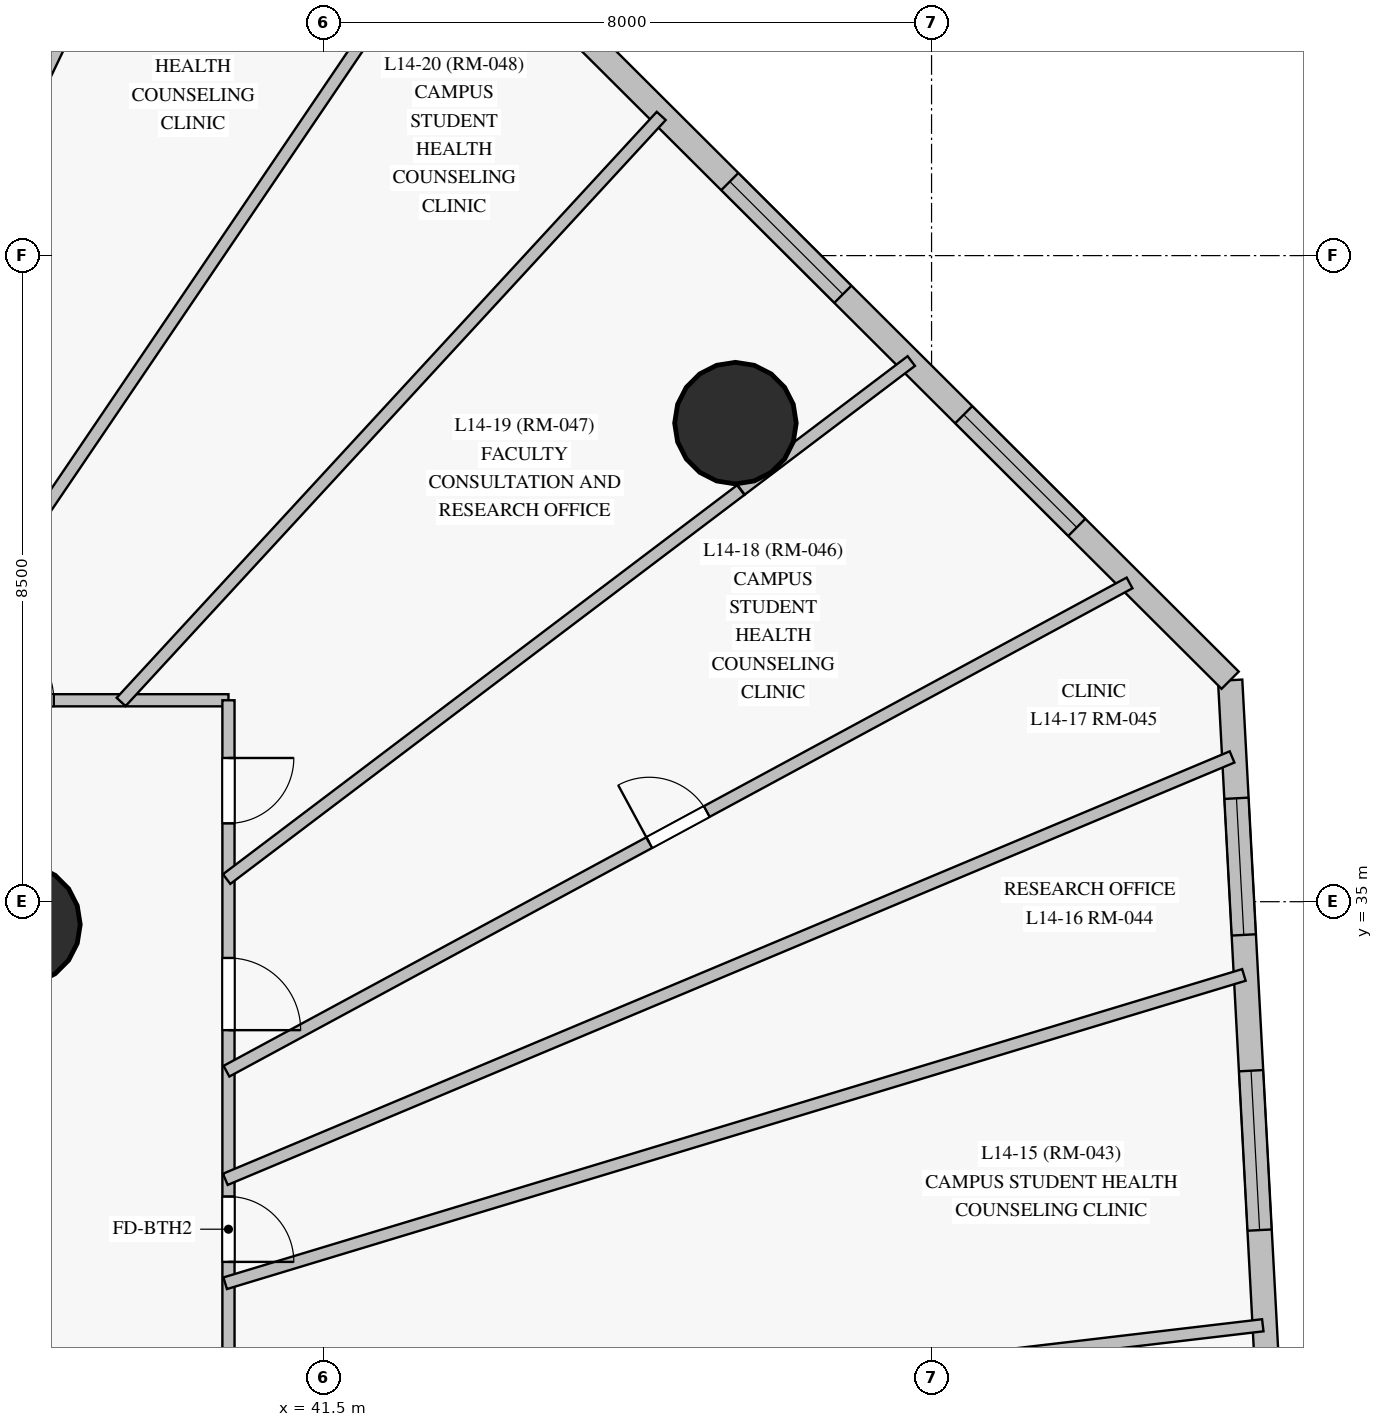
"""IFC4 building model, lengths in metres.
Left out: names, types, materials, properties, quantities, classifications, styles, units other than length and angle.
Written with IfcOpenShell. Run it as: python <this file> out.ifc"""

import sys

from ifc_helpers import new_model, si_unit, direction, frame, frame_2d, origin, origin_with_axes, origin_2d, place, context, subcontext, project, spatial, rectangle, circle, extrude, source, transform, mapped, element, fill, save


model = new_model("IFC4")
c1 = context("Model", 3, precision=1e-05, world=origin(), true_north=direction((0.0, 1.0)))
c2 = subcontext(c1, "Body", "Model", "MODEL_VIEW")
j1 = project(units=[si_unit("LENGTHUNIT", "METRE"), si_unit("PLANEANGLEUNIT", "RADIAN")], contexts=[c1])
p1 = place(None, origin())
s1 = spatial("IfcSite", under=j1, at=p1, CompositionType="ELEMENT")
p2 = place(p1, origin())
s2 = spatial("IfcBuilding", under=s1, at=p2, CompositionType="ELEMENT")
p3 = place(p2, frame((0.0, 0.0, 55.3)))
s3 = spatial("IfcBuildingStorey", under=s2, at=p3, CompositionType="ELEMENT", Elevation=55.3)
m1 = source(origin_with_axes(), c2, "Body", "SweptSolid", [
    extrude(circle(Radius=0.8, at=origin_2d()), origin(), (0.0, 0.0, 1.0), 3.6),
])
for number, where, z_axis, x_axis in (
    (1, (37.5, 34.7, 0.0), (0.0, 0.0, 1.0), (1.0, 0.0, 0.0)),
    (2, (46.92, 41.296, 0.0), (0.0, 0.0, 1.0), (1.0, 0.0, 0.0)),
):
    element("IfcColumn", number, at=place(p3, frame(where, z_axis=z_axis, x_axis=x_axis)), inside=s3, PredefinedType="COLUMN", context=c2, shape_type="MappedRepresentation", body=[
        mapped(m1, transform((0.0, 0.0, 0.0), scale=1.0)),
    ])
p4 = place(p3, frame((53.981, 27.6, 0.0), z_axis=(0.0, 0.0, 1.0), x_axis=(-0.053491775133, 0.9985682901, 0.0)))
e3 = element("IfcWall", 3, at=p4, inside=s3, PredefinedType="SOLIDWALL", context=c2, shape_type="SweptSolid", body=[
    extrude(rectangle(XDim=10.329, YDim=0.32, at=frame_2d((5.164, 0.0))), origin(), (0.0, 0.0, 1.0), 3.35),
])
p5 = place(p4, frame((3.084, 0.0, 0.85)))
e4 = element("IfcOpeningElement", 4, at=p5, cuts=e3, PredefinedType="OPENING", context=c2, shape_type="SweptSolid", body=[
    extrude(rectangle(XDim=2.1, YDim=1.95, at=frame_2d((1.05, 0.975))), frame((0.0, 0.17, 0.0), z_axis=(0.0, -1.0, 0.0), x_axis=(1.0, 0.0, 0.0)), (0.0, 0.0, 1.0), 0.34),
])
p6 = place(p4, frame((6.973, 0.0, 0.85)))
e5 = element("IfcOpeningElement", 5, at=p6, cuts=e3, PredefinedType="OPENING", context=c2, shape_type="SweptSolid", body=[
    extrude(rectangle(XDim=1.8, YDim=1.85, at=frame_2d((0.9, 0.925))), frame((0.0, 0.17, 0.0), z_axis=(0.0, -1.0, 0.0), x_axis=(1.0, 0.0, 0.0)), (0.0, 0.0, 1.0), 0.34),
])
p7 = place(p3, frame((53.428, 37.914, 0.0), z_axis=(0.0, 0.0, 1.0), x_axis=(-0.708311107064, 0.70590040063, 0.0)))
e6 = element("IfcWall", 6, at=p7, inside=s3, PredefinedType="SOLIDWALL", context=c2, shape_type="SweptSolid", body=[
    extrude(rectangle(XDim=12.862, YDim=0.32, at=frame_2d((6.431, 0.0))), origin(), (0.0, 0.0, 1.0), 3.35),
])
p8 = place(p7, frame((2.848, 0.0, 0.85)))
e7 = element("IfcOpeningElement", 7, at=p8, cuts=e6, PredefinedType="OPENING", context=c2, shape_type="SweptSolid", body=[
    extrude(rectangle(XDim=2.1, YDim=1.95, at=frame_2d((1.05, 0.975))), frame((0.0, 0.17, 0.0), z_axis=(0.0, -1.0, 0.0), x_axis=(1.0, 0.0, 0.0)), (0.0, 0.0, 1.0), 0.34),
])
p9 = place(p7, frame((7.193, 0.0, 0.85)))
e8 = element("IfcOpeningElement", 8, at=p9, cuts=e6, PredefinedType="OPENING", context=c2, shape_type="SweptSolid", body=[
    extrude(rectangle(XDim=2.1, YDim=1.95, at=frame_2d((1.05, 0.975))), frame((0.0, 0.17, 0.0), z_axis=(0.0, -1.0, 0.0), x_axis=(1.0, 0.0, 0.0)), (0.0, 0.0, 1.0), 0.34),
])
p10 = place(p3, frame((10.5, 37.65, 0.0), z_axis=(0.0, 0.0, 1.0), x_axis=(1.0, 0.0, 0.0)))
e9 = element("IfcWall", 9, at=p10, inside=s3, PredefinedType="PARTITIONING", context=c2, shape_type="SweptSolid", body=[
    extrude(rectangle(XDim=29.75, YDim=0.16, at=frame_2d((14.875, 0.0))), origin(), (0.0, 0.0, 1.0), 2.75),
])
p11 = place(p10, frame((26.502, 0.0, 0.0)))
e10 = element("IfcOpeningElement", 10, at=p11, cuts=e9, PredefinedType="OPENING", context=c2, shape_type="SweptSolid", body=[
    extrude(rectangle(XDim=0.95, YDim=2.15, at=frame_2d((0.475, 1.075))), frame((0.0, 0.09, 0.0), z_axis=(0.0, -1.0, 0.0), x_axis=(1.0, 0.0, 0.0)), (0.0, 0.0, 1.0), 0.18),
])
p12 = place(p10, frame((24.014, 0.0, 0.0)))
e11 = element("IfcOpeningElement", 11, at=p12, cuts=e9, PredefinedType="OPENING", context=c2, shape_type="SweptSolid", body=[
    extrude(rectangle(XDim=0.95, YDim=2.15, at=frame_2d((0.475, 1.075))), frame((0.0, 0.09, 0.0), z_axis=(0.0, -1.0, 0.0), x_axis=(1.0, 0.0, 0.0)), (0.0, 0.0, 1.0), 0.18),
])
p13 = place(p10, frame((21.837, 0.0, 0.0)))
e12 = element("IfcOpeningElement", 12, at=p13, cuts=e9, PredefinedType="OPENING", context=c2, shape_type="SweptSolid", body=[
    extrude(rectangle(XDim=0.95, YDim=2.15, at=frame_2d((0.475, 1.075))), frame((0.0, 0.09, 0.0), z_axis=(0.0, -1.0, 0.0), x_axis=(1.0, 0.0, 0.0)), (0.0, 0.0, 1.0), 0.18),
])
p14 = place(p10, frame((18.823, 0.0, 0.0)))
e13 = element("IfcOpeningElement", 13, at=p14, cuts=e9, PredefinedType="OPENING", context=c2, shape_type="SweptSolid", body=[
    extrude(rectangle(XDim=0.95, YDim=2.15, at=frame_2d((0.475, 1.075))), frame((0.0, 0.09, 0.0), z_axis=(0.0, -1.0, 0.0), x_axis=(1.0, 0.0, 0.0)), (0.0, 0.0, 1.0), 0.18),
])
p15 = place(p10, frame((15.836, 0.0, 0.0)))
e14 = element("IfcOpeningElement", 14, at=p15, cuts=e9, PredefinedType="OPENING", context=c2, shape_type="SweptSolid", body=[
    extrude(rectangle(XDim=0.95, YDim=2.15, at=frame_2d((0.475, 1.075))), frame((0.0, 0.09, 0.0), z_axis=(0.0, -1.0, 0.0), x_axis=(1.0, 0.0, 0.0)), (0.0, 0.0, 1.0), 0.18),
])
p16 = place(p10, frame((13.96, 0.0, 0.0)))
e15 = element("IfcOpeningElement", 15, at=p16, cuts=e9, PredefinedType="OPENING", context=c2, shape_type="SweptSolid", body=[
    extrude(rectangle(XDim=0.95, YDim=2.15, at=frame_2d((0.475, 1.075))), frame((0.0, 0.09, 0.0), z_axis=(0.0, -1.0, 0.0), x_axis=(1.0, 0.0, 0.0)), (0.0, 0.0, 1.0), 0.18),
])
p17 = place(p10, frame((9.938, 0.0, 0.0)))
e16 = element("IfcOpeningElement", 16, at=p17, cuts=e9, PredefinedType="OPENING", context=c2, shape_type="SweptSolid", body=[
    extrude(rectangle(XDim=0.95, YDim=2.15, at=frame_2d((0.475, 1.075))), frame((0.0, 0.09, 0.0), z_axis=(0.0, -1.0, 0.0), x_axis=(1.0, 0.0, 0.0)), (0.0, 0.0, 1.0), 0.18),
])
p18 = place(p10, frame((2.577, 0.0, 0.0)))
e17 = element("IfcOpeningElement", 17, at=p18, cuts=e9, PredefinedType="OPENING", context=c2, shape_type="SweptSolid", body=[
    extrude(rectangle(XDim=0.95, YDim=2.15, at=frame_2d((0.475, 1.075))), frame((0.0, 0.09, 0.0), z_axis=(0.0, -1.0, 0.0), x_axis=(1.0, 0.0, 0.0)), (0.0, 0.0, 1.0), 0.18),
])
p19 = place(p3, frame((40.25, 37.65, 0.0), z_axis=(0.0, 0.0, 1.0), x_axis=(0.0, -1.0, 0.0)))
e18 = element("IfcWall", 18, at=p19, inside=s3, PredefinedType="PARTITIONING", context=c2, shape_type="SweptSolid", body=[
    extrude(rectangle(XDim=22.3, YDim=0.16, at=frame_2d((11.15, 0.0))), origin(), (0.0, 0.0, 1.0), 2.75),
])
p20 = place(p19, frame((16.25, 0.0, 0.0)))
e19 = element("IfcOpeningElement", 19, at=p20, cuts=e18, PredefinedType="OPENING", context=c2, shape_type="SweptSolid", body=[
    extrude(rectangle(XDim=0.95, YDim=2.15, at=frame_2d((0.475, 1.075))), frame((0.0, 0.09, 0.0), z_axis=(0.0, -1.0, 0.0), x_axis=(1.0, 0.0, 0.0)), (0.0, 0.0, 1.0), 0.18),
])
p21 = place(p19, frame((13.58, 0.0, 0.0)))
e20 = element("IfcOpeningElement", 20, at=p21, cuts=e18, PredefinedType="OPENING", context=c2, shape_type="SweptSolid", body=[
    extrude(rectangle(XDim=0.95, YDim=2.15, at=frame_2d((0.475, 1.075))), frame((0.0, 0.09, 0.0), z_axis=(0.0, -1.0, 0.0), x_axis=(1.0, 0.0, 0.0)), (0.0, 0.0, 1.0), 0.18),
])
p22 = place(p19, frame((10.151, 0.0, 0.0)))
e21 = element("IfcOpeningElement", 21, at=p22, cuts=e18, PredefinedType="OPENING", context=c2, shape_type="SweptSolid", body=[
    extrude(rectangle(XDim=0.86, YDim=2.1, at=frame_2d((0.43, 1.05))), frame((0.0, 0.09, 0.0), z_axis=(0.0, -1.0, 0.0), x_axis=(1.0, 0.0, 0.0)), (0.0, 0.0, 1.0), 0.18),
])
p23 = place(p19, frame((8.711, 0.0, 0.0)))
e22 = element("IfcOpeningElement", 22, at=p23, cuts=e18, PredefinedType="OPENING", context=c2, shape_type="SweptSolid", body=[
    extrude(rectangle(XDim=0.86, YDim=2.1, at=frame_2d((0.43, 1.05))), frame((0.0, 0.09, 0.0), z_axis=(0.0, -1.0, 0.0), x_axis=(1.0, 0.0, 0.0)), (0.0, 0.0, 1.0), 0.18),
])
p24 = place(p19, frame((3.39, 0.0, 0.0)))
e23 = element("IfcOpeningElement", 23, at=p24, cuts=e18, PredefinedType="OPENING", context=c2, shape_type="SweptSolid", body=[
    extrude(rectangle(XDim=0.95, YDim=2.15, at=frame_2d((0.475, 1.075))), frame((0.0, 0.09, 0.0), z_axis=(0.0, -1.0, 0.0), x_axis=(1.0, 0.0, 0.0)), (0.0, 0.0, 1.0), 0.18),
])
p25 = place(p19, frame((0.759, 0.0, 0.0)))
e24 = element("IfcOpeningElement", 24, at=p25, cuts=e18, PredefinedType="OPENING", context=c2, shape_type="SweptSolid", body=[
    extrude(rectangle(XDim=0.86, YDim=2.1, at=frame_2d((0.43, 1.05))), frame((0.0, 0.09, 0.0), z_axis=(0.0, -1.0, 0.0), x_axis=(1.0, 0.0, 0.0)), (0.0, 0.0, 1.0), 0.18),
])
p26 = place(p19, frame((15.09, 0.0, 0.0)))
e25 = element("IfcOpeningElement", 25, at=p26, cuts=e18, PredefinedType="OPENING", context=c2, shape_type="SweptSolid", body=[
    extrude(rectangle(XDim=0.95, YDim=2.15, at=frame_2d((0.475, 1.075))), frame((0.0, 0.09, 0.0), z_axis=(0.0, -1.0, 0.0), x_axis=(1.0, 0.0, 0.0)), (0.0, 0.0, 1.0), 0.18),
])
p27 = place(p19, frame((17.345, 0.0, 0.0)))
e26 = element("IfcOpeningElement", 26, at=p27, cuts=e18, PredefinedType="OPENING", context=c2, shape_type="SweptSolid", body=[
    extrude(rectangle(XDim=0.95, YDim=2.15, at=frame_2d((0.475, 1.075))), frame((0.0, 0.09, 0.0), z_axis=(0.0, -1.0, 0.0), x_axis=(1.0, 0.0, 0.0)), (0.0, 0.0, 1.0), 0.18),
])
p28 = place(p19, frame((18.437, 0.0, 0.0)))
e27 = element("IfcOpeningElement", 27, at=p28, cuts=e18, PredefinedType="OPENING", context=c2, shape_type="SweptSolid", body=[
    extrude(rectangle(XDim=0.95, YDim=2.15, at=frame_2d((0.475, 1.075))), frame((0.0, 0.09, 0.0), z_axis=(0.0, -1.0, 0.0), x_axis=(1.0, 0.0, 0.0)), (0.0, 0.0, 1.0), 0.18),
])
p29 = place(p19, frame((6.529, 0.0, 0.0)))
e28 = element("IfcOpeningElement", 28, at=p29, cuts=e18, PredefinedType="OPENING", context=c2, shape_type="SweptSolid", body=[
    extrude(rectangle(XDim=0.86, YDim=2.04, at=frame_2d((0.43, 1.02))), frame((0.0, 0.09, 0.0), z_axis=(0.0, -1.0, 0.0), x_axis=(1.0, 0.0, 0.0)), (0.0, 0.0, 1.0), 0.18),
])
p30 = place(p3, frame((40.208, 31.347, 0.0), z_axis=(0.0, 0.0, 1.0), x_axis=(0.922132774038, 0.386873554337, 0.0)))
e29 = element("IfcWall", 29, at=p30, inside=s3, PredefinedType="PARTITIONING", context=c2, shape_type="SweptSolid", body=[
    extrude(rectangle(XDim=14.364, YDim=0.16, at=frame_2d((7.182, 0.0))), origin(), (0.0, 0.0, 1.0), 3.35),
])
p31 = place(p3, frame((40.207, 29.98, 0.0), z_axis=(0.0, 0.0, 1.0), x_axis=(0.957126698235, 0.289669610982, 0.0)))
e30 = element("IfcWall", 30, at=p31, inside=s3, PredefinedType="PARTITIONING", context=c2, shape_type="SweptSolid", body=[
    extrude(rectangle(XDim=14.003, YDim=0.16, at=frame_2d((7.001, 0.0))), origin(), (0.0, 0.0, 1.0), 3.35),
])
p32 = place(p3, frame((40.205, 27.819, 0.0), z_axis=(0.0, 0.0, 1.0), x_axis=(0.993129615967, 0.117019510723, 0.0)))
e31 = element("IfcWall", 31, at=p32, inside=s3, PredefinedType="PARTITIONING", context=c2, shape_type="SweptSolid", body=[
    extrude(rectangle(XDim=13.747, YDim=0.16, at=frame_2d((6.874, 0.0))), origin(), (0.0, 0.0, 1.0), 3.35),
])
p33 = place(p3, frame((40.224, 32.77, 0.0), z_axis=(0.0, 0.0, 1.0), x_axis=(0.879664206946, 0.47559529331, 0.0)))
e32 = element("IfcWall", 32, at=p33, inside=s3, PredefinedType="PARTITIONING", context=c2, shape_type="SweptSolid", body=[
    extrude(rectangle(XDim=13.506, YDim=0.16, at=frame_2d((6.753, 0.0))), origin(), (0.0, 0.0, 1.0), 3.35),
])
p34 = place(p33, frame((6.323, 0.0, 0.0)))
e33 = element("IfcOpeningElement", 33, at=p34, cuts=e32, PredefinedType="OPENING", context=c2, shape_type="SweptSolid", body=[
    extrude(rectangle(XDim=0.86, YDim=2.04, at=frame_2d((0.43, 1.02))), frame((0.0, 0.09, 0.0), z_axis=(0.0, -1.0, 0.0), x_axis=(1.0, 0.0, 0.0)), (0.0, 0.0, 1.0), 0.18),
])
p35 = place(p3, frame((33.887, 37.623, 0.0), z_axis=(0.0, 0.0, 1.0), x_axis=(0.431532706121, 0.90209729162, 0.0)))
e34 = element("IfcWall", 34, at=p35, inside=s3, PredefinedType="PARTITIONING", context=c2, shape_type="SweptSolid", body=[
    extrude(rectangle(XDim=11.972, YDim=0.16, at=frame_2d((5.986, 0.0))), origin(), (0.0, 0.0, 1.0), 3.35),
])
p36 = place(p3, frame((36.105, 37.613, 0.0), z_axis=(0.0, 0.0, 1.0), x_axis=(0.561087811849, 0.827756285023, 0.0)))
e35 = element("IfcWall", 35, at=p36, inside=s3, PredefinedType="PARTITIONING", context=c2, shape_type="SweptSolid", body=[
    extrude(rectangle(XDim=11.824, YDim=0.16, at=frame_2d((5.912, 0.0))), origin(), (0.0, 0.0, 1.0), 3.35),
])
p37 = place(p3, frame((38.838, 37.628, 0.0), z_axis=(0.0, 0.0, 1.0), x_axis=(0.677727677692, 0.735312991107, 0.0)))
e36 = element("IfcWall", 36, at=p37, inside=s3, PredefinedType="PARTITIONING", context=c2, shape_type="SweptSolid", body=[
    extrude(rectangle(XDim=10.485, YDim=0.16, at=frame_2d((5.242, 0.0))), origin(), (0.0, 0.0, 1.0), 3.35),
])
p38 = place(p3, frame((40.226, 35.298, 0.0), z_axis=(0.0, 0.0, 1.0), x_axis=(0.797440445862, 0.603397659346, 0.0)))
e37 = element("IfcWall", 37, at=p38, inside=s3, PredefinedType="PARTITIONING", context=c2, shape_type="SweptSolid", body=[
    extrude(rectangle(XDim=8.483, YDim=0.16, at=frame_2d((4.241, 0.0))), origin(), (0.0, 0.0, 1.0), 3.35),
])
p39 = place(p3, frame((46.994, 40.419, 0.0), z_axis=(0.0, 0.0, 1.0), x_axis=(0.797425610969, 0.603417264396, 0.0)))
e38 = element("IfcWall", 38, at=p39, inside=s3, PredefinedType="PARTITIONING", context=c2, shape_type="SweptSolid", body=[
    extrude(rectangle(XDim=2.808, YDim=0.16, at=frame_2d((1.404, 0.0))), origin(), (0.0, 0.0, 1.0), 3.35),
])
m2 = source(origin_with_axes(), c2, "Body", "SweptSolid", [
    extrude(rectangle(XDim=2.1, YDim=1.95, at=frame_2d((1.05, 0.975))), frame((0.0, 0.03, 0.0), z_axis=(0.0, -1.0, 0.0), x_axis=(1.0, 0.0, 0.0)), (0.0, 0.0, 1.0), 0.06),
])
p40 = place(p5, origin())
e39 = element("IfcWindow", 39, at=p40, inside=s3, PartitioningType="SINGLE_PANEL", PredefinedType="WINDOW", context=c2, shape_type="MappedRepresentation", body=[
    mapped(m2, transform((0.0, 0.0, 0.0), scale=1.0)),
])
fill(e4, e39)
m3 = source(origin_with_axes(), c2, "Body", "SweptSolid", [
    extrude(rectangle(XDim=1.8, YDim=1.85, at=frame_2d((0.9, 0.925))), frame((0.0, 0.03, 0.0), z_axis=(0.0, -1.0, 0.0), x_axis=(1.0, 0.0, 0.0)), (0.0, 0.0, 1.0), 0.06),
])
p41 = place(p6, origin())
e40 = element("IfcWindow", 40, at=p41, inside=s3, PartitioningType="SINGLE_PANEL", PredefinedType="WINDOW", context=c2, shape_type="MappedRepresentation", body=[
    mapped(m3, transform((0.0, 0.0, 0.0), scale=1.0)),
])
fill(e5, e40)
p42 = place(p8, origin())
e41 = element("IfcWindow", 41, at=p42, inside=s3, PartitioningType="SINGLE_PANEL", PredefinedType="WINDOW", context=c2, shape_type="MappedRepresentation", body=[
    mapped(m2, transform((0.0, 0.0, 0.0), scale=1.0)),
])
fill(e7, e41)
p43 = place(p9, origin())
e42 = element("IfcWindow", 42, at=p43, inside=s3, PartitioningType="SINGLE_PANEL", PredefinedType="WINDOW", context=c2, shape_type="MappedRepresentation", body=[
    mapped(m2, transform((0.0, 0.0, 0.0), scale=1.0)),
])
fill(e8, e42)
m4 = source(origin_with_axes(), c2, "Body", "SweptSolid", [
    extrude(rectangle(XDim=0.95, YDim=2.15, at=frame_2d((0.475, 1.075))), frame((0.0, 0.025, 0.0), z_axis=(0.0, -1.0, 0.0), x_axis=(1.0, 0.0, 0.0)), (0.0, 0.0, 1.0), 0.05),
])
p44 = place(p24, origin())
e43 = element("IfcDoor", 43, at=p44, inside=s3, OperationType="SINGLE_SWING_RIGHT", PredefinedType="DOOR", context=c2, shape_type="MappedRepresentation", body=[
    mapped(m4, transform((0.0, 0.0, 0.0), scale=1.0)),
])
fill(e23, e43)
m5 = source(origin_with_axes(), c2, "Body", "SweptSolid", [
    extrude(rectangle(XDim=0.86, YDim=2.1, at=frame_2d((0.43, 1.05))), frame((0.0, 0.025, 0.0), z_axis=(0.0, -1.0, 0.0), x_axis=(1.0, 0.0, 0.0)), (0.0, 0.0, 1.0), 0.05),
])
p45 = place(p25, origin())
e44 = element("IfcDoor", 44, at=p45, inside=s3, OperationType="SINGLE_SWING_LEFT", PredefinedType="DOOR", context=c2, shape_type="MappedRepresentation", body=[
    mapped(m5, transform((0.0, 0.0, 0.0), scale=1.0)),
])
fill(e24, e44)
p46 = place(p11, origin())
e45 = element("IfcDoor", 45, at=p46, inside=s3, OperationType="SINGLE_SWING_LEFT", PredefinedType="DOOR", context=c2, shape_type="MappedRepresentation", body=[
    mapped(m4, transform((0.0, 0.0, 0.0), scale=1.0)),
])
fill(e10, e45)
m6 = source(origin_with_axes(), c2, "Body", "SweptSolid", [
    extrude(rectangle(XDim=0.86, YDim=2.04, at=frame_2d((0.43, 1.02))), frame((0.0, 0.025, 0.0), z_axis=(0.0, -1.0, 0.0), x_axis=(1.0, 0.0, 0.0)), (0.0, 0.0, 1.0), 0.05),
])
p47 = place(p29, origin())
e46 = element("IfcDoor", 46, at=p47, inside=s3, OperationType="SINGLE_SWING_RIGHT", PredefinedType="DOOR", context=c2, shape_type="MappedRepresentation", body=[
    mapped(m6, transform((0.0, 0.0, 0.0), scale=1.0)),
])
fill(e28, e46)
p48 = place(p34, origin())
e47 = element("IfcDoor", 47, at=p48, inside=s3, OperationType="SINGLE_SWING_LEFT", PredefinedType="DOOR", context=c2, shape_type="MappedRepresentation", body=[
    mapped(m6, transform((0.0, 0.0, 0.0), scale=1.0)),
])
fill(e33, e47)
save(model, sys.argv[1])
